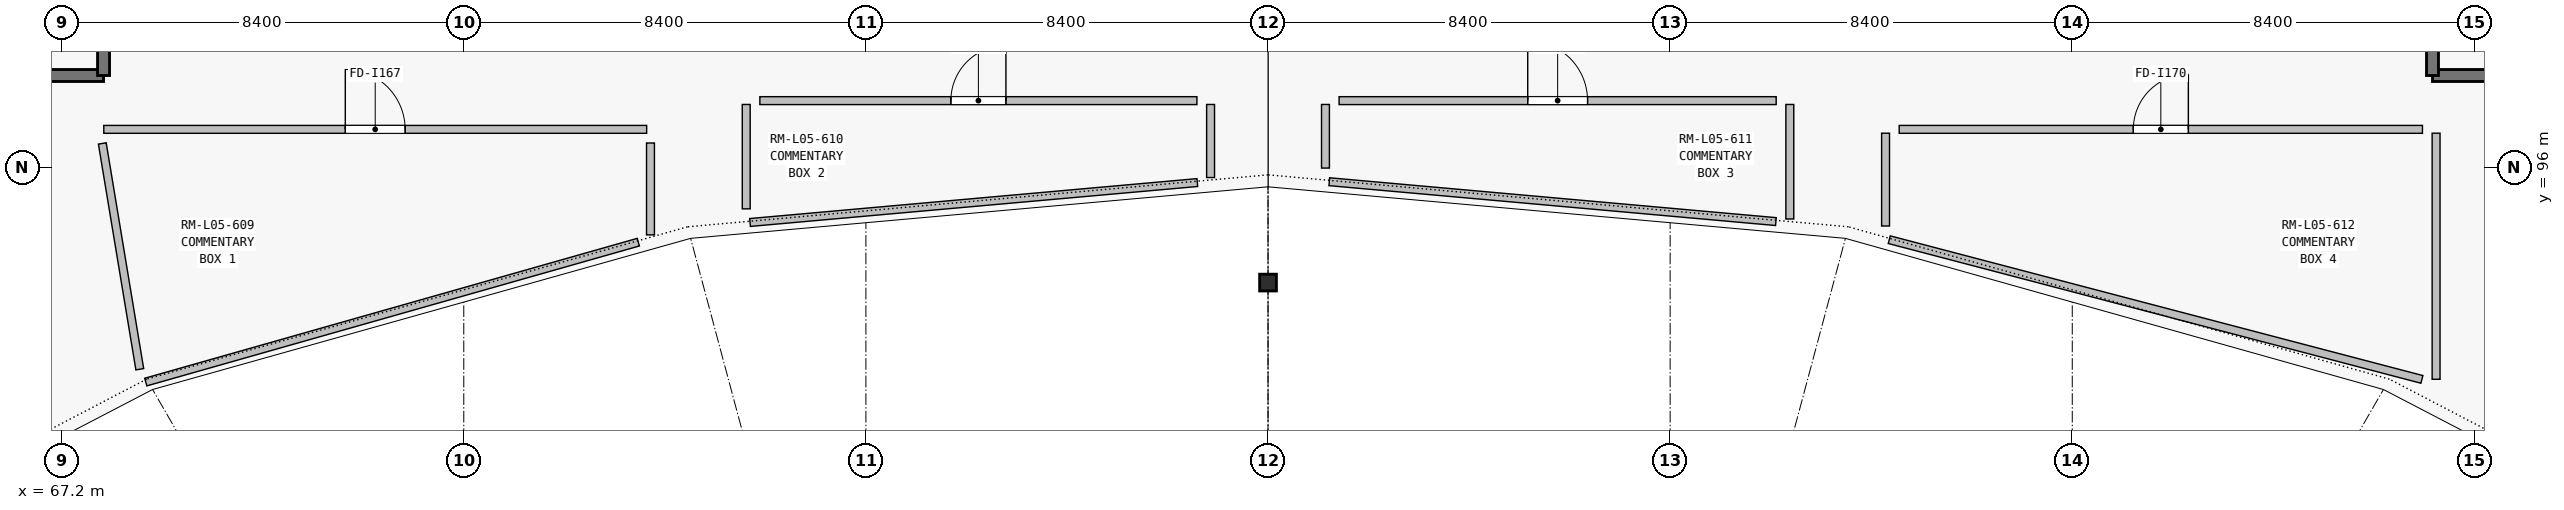
"""IFC4 building model, lengths in metres.
Left out: names, types, materials, properties, quantities, classifications, styles, units other than length and angle.
Written with IfcOpenShell. Run it as: python <this file> out.ifc"""

import sys

from ifc_helpers import new_model, si_unit, direction, frame, frame_2d, origin, origin_2d, place, context, subcontext, project, spatial, rectangle, i_section, extrude, element, fill, save


model = new_model("IFC4")
c1 = context("Model", 3, precision=1e-05, world=origin(), true_north=direction((0.0, 1.0)))
c2 = subcontext(c1, "Body", "Model", "MODEL_VIEW")
j1 = project(units=[si_unit("LENGTHUNIT", "METRE"), si_unit("PLANEANGLEUNIT", "RADIAN")], contexts=[c1])
p1 = place(None, origin())
s1 = spatial("IfcSite", under=j1, at=p1, CompositionType="ELEMENT")
p2 = place(p1, origin())
s2 = spatial("IfcBuilding", under=s1, at=p2, CompositionType="ELEMENT")
p3 = place(p2, frame((0.0, 0.0, 23.4)))
s3 = spatial("IfcBuildingStorey", under=s2, at=p3, CompositionType="ELEMENT", Elevation=23.4)
p4 = place(p3, frame((92.4, 93.6, 0.0), z_axis=(0.0, 0.0, 1.0), x_axis=(0.0, 1.0, 0.0)))
e1 = element("IfcColumn", 1, at=p4, inside=s3, PredefinedType="COLUMN", context=c2, shape_type="SweptSolid", body=[
    extrude(i_section(OverallWidth=0.35, OverallDepth=0.35, WebThickness=0.014, FlangeThickness=0.024, at=origin_2d()), origin(), (0.0, 0.0, 1.0), 2.15),
])
p5 = place(p3, frame((60.725, 97.925, 0.0), z_axis=(0.0, 0.0, 1.0), x_axis=(1.0, 0.0, 0.0)))
e2 = element("IfcWall", 2, at=p5, inside=s3, PredefinedType="SHEAR", context=c2, shape_type="SweptSolid", body=[
    extrude(rectangle(XDim=7.35, YDim=0.25, at=frame_2d((3.675, 0.0))), origin(), (0.0, 0.0, 1.0), 3.08),
])
p6 = place(p5, frame((2.975, 0.0, 0.0)))
e3 = element("IfcOpeningElement", 3, at=p6, cuts=e2, PredefinedType="OPENING", context=c2, shape_type="SweptSolid", body=[
    extrude(rectangle(XDim=1.4, YDim=2.2, at=frame_2d((0.7, 1.1))), frame((0.0, 0.135, 0.0), z_axis=(0.0, -1.0, 0.0), x_axis=(1.0, 0.0, 0.0)), (0.0, 0.0, 1.0), 0.27),
])
p7 = place(p3, frame((68.075, 97.925, 0.0), z_axis=(0.0, 0.0, 1.0), x_axis=(0.0, 1.0, 0.0)))
e4 = element("IfcWall", 4, at=p7, inside=s3, PredefinedType="SHEAR", context=c2, shape_type="SweptSolid", body=[
    extrude(rectangle(XDim=12.75, YDim=0.25, at=frame_2d((6.375, 0.0))), origin(), (0.0, 0.0, 1.0), 3.08),
])
p8 = place(p3, frame((116.725, 97.925, 0.0), z_axis=(0.0, 0.0, 1.0), x_axis=(1.0, 0.0, 0.0)))
e5 = element("IfcWall", 5, at=p8, inside=s3, PredefinedType="SHEAR", context=c2, shape_type="SweptSolid", body=[
    extrude(rectangle(XDim=7.35, YDim=0.25, at=frame_2d((3.675, 0.0))), origin(), (0.0, 0.0, 1.0), 3.08),
])
p9 = place(p8, frame((3.015, 0.0, 0.0)))
e6 = element("IfcOpeningElement", 6, at=p9, cuts=e5, PredefinedType="OPENING", context=c2, shape_type="SweptSolid", body=[
    extrude(rectangle(XDim=1.32, YDim=2.2, at=frame_2d((0.66, 1.1))), frame((0.0, 0.135, 0.0), z_axis=(0.0, -1.0, 0.0), x_axis=(1.0, 0.0, 0.0)), (0.0, 0.0, 1.0), 0.27),
])
p10 = place(p3, frame((116.725, 97.925, 0.0), z_axis=(0.0, 0.0, 1.0), x_axis=(0.0, 1.0, 0.0)))
e7 = element("IfcWall", 7, at=p10, inside=s3, PredefinedType="SHEAR", context=c2, shape_type="SweptSolid", body=[
    extrude(rectangle(XDim=12.75, YDim=0.25, at=frame_2d((6.375, 0.0))), origin(), (0.0, 0.0, 1.0), 3.08),
])
p11 = place(p3, frame((68.08, 96.8, 0.0), z_axis=(0.0, 0.0, 1.0), x_axis=(1.0, 0.0, 0.0)))
e8 = element("IfcWall", 8, at=p11, inside=s3, PredefinedType="PARTITIONING", context=c2, shape_type="SweptSolid", body=[
    extrude(rectangle(XDim=11.34, YDim=0.165, at=frame_2d((5.67, 0.0))), origin(), (0.0, 0.0, 1.0), 3.9),
])
p12 = place(p11, frame((5.045, 0.0, 0.0)))
e9 = element("IfcOpeningElement", 9, at=p12, cuts=e8, PredefinedType="OPENING", context=c2, shape_type="SweptSolid", body=[
    extrude(rectangle(XDim=1.25, YDim=2.25, at=frame_2d((0.625, 1.125))), frame((0.0, 0.093, 0.0), z_axis=(0.0, -1.0, 0.0), x_axis=(1.0, 0.0, 0.0)), (0.0, 0.0, 1.0), 0.185),
])
p13 = place(p3, frame((79.5, 96.515, 0.0), z_axis=(0.0, 0.0, 1.0), x_axis=(0.0, -1.0, 0.0)))
e10 = element("IfcWall", 10, at=p13, inside=s3, PredefinedType="PARTITIONING", context=c2, shape_type="SweptSolid", body=[
    extrude(rectangle(XDim=1.919, YDim=0.165, at=frame_2d((0.959, 0.0))), origin(), (0.0, 0.0, 1.0), 3.9),
])
p14 = place(p3, frame((79.246, 94.444, 0.0), z_axis=(0.0, 0.0, 1.0), x_axis=(-0.961963717296, -0.27317724394, 0.0)))
e11 = element("IfcWall", 11, at=p14, inside=s3, PredefinedType="PARTITIONING", context=c2, shape_type="SweptSolid", body=[
    extrude(rectangle(XDim=10.696, YDim=0.165, at=frame_2d((5.348, 0.0))), origin(), (0.0, 0.0, 1.0), 3.9),
])
p15 = place(p3, frame((68.832, 91.79, 0.0), z_axis=(0.0, 0.0, 1.0), x_axis=(-0.163835799107, 0.986487623303, 0.0)))
e12 = element("IfcWall", 12, at=p15, inside=s3, PredefinedType="PARTITIONING", context=c2, shape_type="SweptSolid", body=[
    extrude(rectangle(XDim=4.781, YDim=0.165, at=frame_2d((2.39, 0.0))), origin(), (0.0, 0.0, 1.0), 3.9),
])
p16 = place(p3, frame((91.2, 97.32, 0.0), z_axis=(0.0, 0.0, 1.0), x_axis=(0.0, -1.0, 0.0)))
e13 = element("IfcWall", 13, at=p16, inside=s3, PredefinedType="PARTITIONING", context=c2, shape_type="SweptSolid", body=[
    extrude(rectangle(XDim=1.526, YDim=0.165, at=frame_2d((0.763, 0.0))), origin(), (0.0, 0.0, 1.0), 3.9),
])
p17 = place(p3, frame((90.923, 95.689, 0.0), z_axis=(0.0, 0.0, 1.0), x_axis=(-0.996040339517, -0.088902429969, 0.0)))
e14 = element("IfcWall", 14, at=p17, inside=s3, PredefinedType="PARTITIONING", context=c2, shape_type="SweptSolid", body=[
    extrude(rectangle(XDim=9.381, YDim=0.165, at=frame_2d((4.69, 0.0))), origin(), (0.0, 0.0, 1.0), 3.9),
])
p18 = place(p3, frame((81.5, 95.14, 0.0), z_axis=(0.0, 0.0, 1.0), x_axis=(0.0, 1.0, 0.0)))
e15 = element("IfcWall", 15, at=p18, inside=s3, PredefinedType="PARTITIONING", context=c2, shape_type="SweptSolid", body=[
    extrude(rectangle(XDim=2.18, YDim=0.165, at=frame_2d((1.09, 0.0))), origin(), (0.0, 0.0, 1.0), 3.9),
])
p19 = place(p3, frame((81.785, 97.4, 0.0), z_axis=(0.0, 0.0, 1.0), x_axis=(1.0, 0.0, 0.0)))
e16 = element("IfcWall", 16, at=p19, inside=s3, PredefinedType="PARTITIONING", context=c2, shape_type="SweptSolid", body=[
    extrude(rectangle(XDim=9.13, YDim=0.165, at=frame_2d((4.565, 0.0))), origin(), (0.0, 0.0, 1.0), 3.9),
])
p20 = place(p19, frame((3.99, 0.0, 0.0)))
e17 = element("IfcOpeningElement", 17, at=p20, cuts=e16, PredefinedType="OPENING", context=c2, shape_type="SweptSolid", body=[
    extrude(rectangle(XDim=1.15, YDim=2.2, at=frame_2d((0.575, 1.1))), frame((0.0, 0.093, 0.0), z_axis=(0.0, -1.0, 0.0), x_axis=(1.0, 0.0, 0.0)), (0.0, 0.0, 1.0), 0.185),
])
p21 = place(p3, frame((103.3, 97.32, 0.0), z_axis=(0.0, 0.0, 1.0), x_axis=(0.0, -1.0, 0.0)))
e18 = element("IfcWall", 18, at=p21, inside=s3, PredefinedType="PARTITIONING", context=c2, shape_type="SweptSolid", body=[
    extrude(rectangle(XDim=2.392, YDim=0.165, at=frame_2d((1.196, 0.0))), origin(), (0.0, 0.0, 1.0), 3.9),
])
p22 = place(p3, frame((103.009, 94.874, 0.0), z_axis=(0.0, 0.0, 1.0), x_axis=(-0.996039725317, 0.088909311047, 0.0)))
e19 = element("IfcWall", 19, at=p22, inside=s3, PredefinedType="PARTITIONING", context=c2, shape_type="SweptSolid", body=[
    extrude(rectangle(XDim=9.366, YDim=0.165, at=frame_2d((4.683, 0.0))), origin(), (0.0, 0.0, 1.0), 3.9),
])
p23 = place(p3, frame((93.6, 95.991, 0.0), z_axis=(0.0, 0.0, 1.0), x_axis=(0.0, 1.0, 0.0)))
e20 = element("IfcWall", 20, at=p23, inside=s3, PredefinedType="PARTITIONING", context=c2, shape_type="SweptSolid", body=[
    extrude(rectangle(XDim=1.329, YDim=0.165, at=frame_2d((0.664, 0.0))), origin(), (0.0, 0.0, 1.0), 3.9),
])
p24 = place(p3, frame((93.885, 97.4, 0.0), z_axis=(0.0, 0.0, 1.0), x_axis=(1.0, 0.0, 0.0)))
e21 = element("IfcWall", 21, at=p24, inside=s3, PredefinedType="PARTITIONING", context=c2, shape_type="SweptSolid", body=[
    extrude(rectangle(XDim=9.13, YDim=0.165, at=frame_2d((4.565, 0.0))), origin(), (0.0, 0.0, 1.0), 3.9),
])
p25 = place(p24, frame((3.94, 0.0, 0.0)))
e22 = element("IfcOpeningElement", 22, at=p25, cuts=e21, PredefinedType="OPENING", context=c2, shape_type="SweptSolid", body=[
    extrude(rectangle(XDim=1.25, YDim=2.25, at=frame_2d((0.625, 1.125))), frame((0.0, 0.093, 0.0), z_axis=(0.0, -1.0, 0.0), x_axis=(1.0, 0.0, 0.0)), (0.0, 0.0, 1.0), 0.185),
])
p26 = place(p3, frame((116.8, 96.72, 0.0), z_axis=(0.0, 0.0, 1.0), x_axis=(0.0, -1.0, 0.0)))
e23 = element("IfcWall", 23, at=p26, inside=s3, PredefinedType="PARTITIONING", context=c2, shape_type="SweptSolid", body=[
    extrude(rectangle(XDim=5.14, YDim=0.165, at=frame_2d((2.57, 0.0))), origin(), (0.0, 0.0, 1.0), 3.9),
])
p27 = place(p3, frame((116.504, 91.578, 0.0), z_axis=(0.0, 0.0, 1.0), x_axis=(-0.967283979081, 0.25369608553, 0.0)))
e24 = element("IfcWall", 24, at=p27, inside=s3, PredefinedType="PARTITIONING", context=c2, shape_type="SweptSolid", body=[
    extrude(rectangle(XDim=11.503, YDim=0.165, at=frame_2d((5.751, 0.0))), origin(), (0.0, 0.0, 1.0), 3.9),
])
p28 = place(p3, frame((105.3, 94.781, 0.0), z_axis=(0.0, 0.0, 1.0), x_axis=(0.0, 1.0, 0.0)))
e25 = element("IfcWall", 25, at=p28, inside=s3, PredefinedType="PARTITIONING", context=c2, shape_type="SweptSolid", body=[
    extrude(rectangle(XDim=1.938, YDim=0.165, at=frame_2d((0.969, 0.0))), origin(), (0.0, 0.0, 1.0), 3.9),
])
p29 = place(p3, frame((105.585, 96.8, 0.0), z_axis=(0.0, 0.0, 1.0), x_axis=(1.0, 0.0, 0.0)))
e26 = element("IfcWall", 26, at=p29, inside=s3, PredefinedType="PARTITIONING", context=c2, shape_type="SweptSolid", body=[
    extrude(rectangle(XDim=10.93, YDim=0.165, at=frame_2d((5.465, 0.0))), origin(), (0.0, 0.0, 1.0), 3.9),
])
p30 = place(p29, frame((4.89, 0.0, 0.0)))
e27 = element("IfcOpeningElement", 27, at=p30, cuts=e26, PredefinedType="OPENING", context=c2, shape_type="SweptSolid", body=[
    extrude(rectangle(XDim=1.15, YDim=2.2, at=frame_2d((0.575, 1.1))), frame((0.0, 0.093, 0.0), z_axis=(0.0, -1.0, 0.0), x_axis=(1.0, 0.0, 0.0)), (0.0, 0.0, 1.0), 0.185),
])
p31 = place(p12, origin())
e28 = element("IfcDoor", 28, at=p31, inside=s3, OperationType="SINGLE_SWING_LEFT", PredefinedType="DOOR", context=c2, shape_type="SweptSolid", body=[
    extrude(rectangle(XDim=1.25, YDim=2.25, at=frame_2d((0.625, 1.125))), frame((0.0, 0.025, 0.0), z_axis=(0.0, -1.0, 0.0), x_axis=(1.0, 0.0, 0.0)), (0.0, 0.0, 1.0), 0.05),
])
fill(e9, e28)
p32 = place(p20, origin())
e29 = element("IfcDoor", 29, at=p32, inside=s3, OperationType="SINGLE_SWING_RIGHT", PredefinedType="DOOR", context=c2, shape_type="SweptSolid", body=[
    extrude(rectangle(XDim=1.15, YDim=2.2, at=frame_2d((0.575, 1.1))), frame((0.0, 0.025, 0.0), z_axis=(0.0, -1.0, 0.0), x_axis=(1.0, 0.0, 0.0)), (0.0, 0.0, 1.0), 0.05),
])
fill(e17, e29)
p33 = place(p25, origin())
e30 = element("IfcDoor", 30, at=p33, inside=s3, OperationType="SINGLE_SWING_LEFT", PredefinedType="DOOR", context=c2, shape_type="SweptSolid", body=[
    extrude(rectangle(XDim=1.25, YDim=2.25, at=frame_2d((0.625, 1.125))), frame((0.0, 0.025, 0.0), z_axis=(0.0, -1.0, 0.0), x_axis=(1.0, 0.0, 0.0)), (0.0, 0.0, 1.0), 0.05),
])
fill(e22, e30)
p34 = place(p30, origin())
e31 = element("IfcDoor", 31, at=p34, inside=s3, OperationType="SINGLE_SWING_RIGHT", PredefinedType="DOOR", context=c2, shape_type="SweptSolid", body=[
    extrude(rectangle(XDim=1.15, YDim=2.2, at=frame_2d((0.575, 1.1))), frame((0.0, 0.025, 0.0), z_axis=(0.0, -1.0, 0.0), x_axis=(1.0, 0.0, 0.0)), (0.0, 0.0, 1.0), 0.05),
])
fill(e27, e31)
save(model, sys.argv[1])
